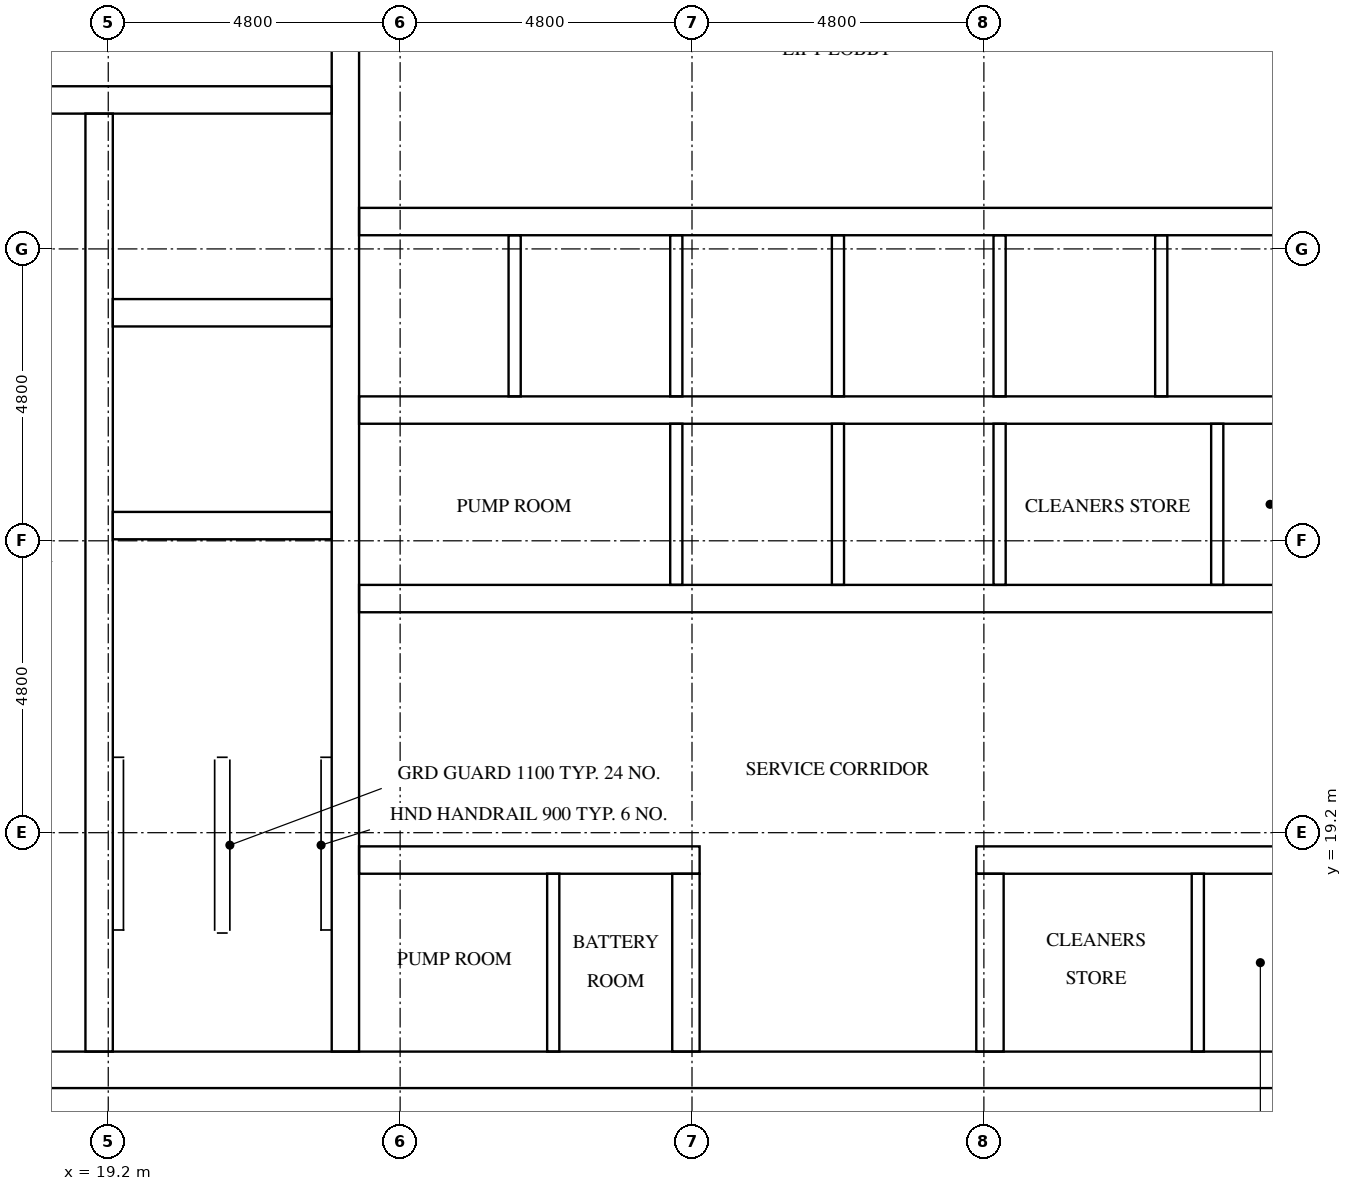
"""IFC4 building model, lengths in metres.
Left out: names, types, materials, properties, quantities, classifications, styles, units other than length and angle.
Written with IfcOpenShell. Run it as: python <this file> out.ifc"""

import sys

from ifc_helpers import new_model, si_unit, direction, frame, frame_2d, origin, place, context, subcontext, project, spatial, rectangle, extrude, element, fill, save


model = new_model("IFC4")
c1 = context("Model", 3, precision=1e-05, world=origin(), true_north=direction((0.0, 1.0)))
c2 = subcontext(c1, "Body", "Model", "MODEL_VIEW")
j1 = project(units=[si_unit("LENGTHUNIT", "METRE"), si_unit("PLANEANGLEUNIT", "RADIAN")], contexts=[c1])
p1 = place(None, origin())
s1 = spatial("IfcSite", under=j1, at=p1, CompositionType="ELEMENT")
p2 = place(p1, origin())
s2 = spatial("IfcBuilding", under=s1, at=p2, CompositionType="ELEMENT")
p3 = place(p2, frame((0.0, 0.0, 259.7)))
s3 = spatial("IfcBuildingStorey", under=s2, at=p3, CompositionType="ELEMENT", Elevation=259.7)
p4 = place(p3, frame((15.0, 15.3, 0.0), z_axis=(0.0, 0.0, 1.0), x_axis=(1.0, 0.0, 0.0)))
e1 = element("IfcWall", 1, at=p4, inside=s3, PredefinedType="SHEAR", context=c2, shape_type="SweptSolid", body=[
    extrude(rectangle(XDim=32.4, YDim=0.6, at=frame_2d((16.2, 0.0))), origin(), (0.0, 0.0, 1.0), 3.1),
])
p5 = place(p4, frame((15.3, 0.0, 0.0)))
e2 = element("IfcOpeningElement", 2, at=p5, cuts=e1, PredefinedType="OPENING", context=c2, shape_type="SweptSolid", body=[
    extrude(rectangle(XDim=1.8, YDim=2.1, at=frame_2d((0.9, 1.05))), frame((0.0, 0.31, 0.0), z_axis=(0.0, -1.0, 0.0), x_axis=(1.0, 0.0, 0.0)), (0.0, 0.0, 1.0), 0.62),
])
p6 = place(p3, frame((19.05, 15.6, 0.0), z_axis=(0.0, 0.0, 1.0), x_axis=(0.0, 1.0, 0.0)))
e3 = element("IfcWall", 3, at=p6, inside=s3, PredefinedType="SHEAR", context=c2, shape_type="SweptSolid", body=[
    extrude(rectangle(XDim=15.425, YDim=0.45, at=frame_2d((7.712, 0.0))), origin(), (0.0, 0.0, 1.0), 3.1),
])
p7 = place(p6, frame((9.85, 0.0, 0.0)))
e4 = element("IfcOpeningElement", 4, at=p7, cuts=e3, PredefinedType="OPENING", context=c2, shape_type="SweptSolid", body=[
    extrude(rectangle(XDim=1.1, YDim=2.1, at=frame_2d((0.55, 1.05))), frame((0.0, 0.235, 0.0), z_axis=(0.0, -1.0, 0.0), x_axis=(1.0, 0.0, 0.0)), (0.0, 0.0, 1.0), 0.47),
])
p8 = place(p6, frame((13.35, 0.0, 0.0)))
e5 = element("IfcOpeningElement", 5, at=p8, cuts=e3, PredefinedType="OPENING", context=c2, shape_type="SweptSolid", body=[
    extrude(rectangle(XDim=1.1, YDim=2.1, at=frame_2d((0.55, 1.05))), frame((0.0, 0.235, 0.0), z_axis=(0.0, -1.0, 0.0), x_axis=(1.0, 0.0, 0.0)), (0.0, 0.0, 1.0), 0.47),
])
p9 = place(p6, frame((0.6, 0.0, 0.0)))
e6 = element("IfcOpeningElement", 6, at=p9, cuts=e3, PredefinedType="OPENING", context=c2, shape_type="SweptSolid", body=[
    extrude(rectangle(XDim=1.2, YDim=2.1, at=frame_2d((0.6, 1.05))), frame((0.0, 0.235, 0.0), z_axis=(0.0, -1.0, 0.0), x_axis=(1.0, 0.0, 0.0)), (0.0, 0.0, 1.0), 0.47),
])
p10 = place(p3, frame((23.1, 15.6, 0.0), z_axis=(0.0, 0.0, 1.0), x_axis=(0.0, 1.0, 0.0)))
e7 = element("IfcWall", 7, at=p10, inside=s3, PredefinedType="SHEAR", context=c2, shape_type="SweptSolid", body=[
    extrude(rectangle(XDim=21.6, YDim=0.45, at=frame_2d((10.8, 0.0))), origin(), (0.0, 0.0, 1.0), 3.1),
])
for number, where, z_axis, x_axis in (
    (8, (19.275, 24.25, 0.0), (0.0, 0.0, 1.0), (1.0, 0.0, 0.0)),
    (9, (19.275, 27.75, 0.0), (0.0, 0.0, 1.0), (1.0, 0.0, 0.0)),
):
    element("IfcWall", number, at=place(p3, frame(where, z_axis=z_axis, x_axis=x_axis)), inside=s3, PredefinedType="SHEAR", context=c2, shape_type="SweptSolid", body=[
        extrude(rectangle(XDim=3.6, YDim=0.45, at=frame_2d((1.8, 0.0))), origin(), (0.0, 0.0, 1.0), 3.1),
    ])
p11 = place(p3, frame((15.6, 31.25, 0.0), z_axis=(0.0, 0.0, 1.0), x_axis=(1.0, 0.0, 0.0)))
e10 = element("IfcWall", 10, at=p11, inside=s3, PredefinedType="SHEAR", context=c2, shape_type="SweptSolid", body=[
    extrude(rectangle(XDim=7.275, YDim=0.45, at=frame_2d((3.637, 0.0))), origin(), (0.0, 0.0, 1.0), 3.1),
])
p12 = place(p3, frame((23.325, 18.75, 0.0), z_axis=(0.0, 0.0, 1.0), x_axis=(1.0, 0.0, 0.0)))
e11 = element("IfcWall", 11, at=p12, inside=s3, PredefinedType="SHEAR", context=c2, shape_type="SweptSolid", body=[
    extrude(rectangle(XDim=5.6, YDim=0.45, at=frame_2d((2.8, 0.0))), origin(), (0.0, 0.0, 1.0), 3.1),
])
p13 = place(p12, frame((1.046, 0.0, 0.0)))
e12 = element("IfcOpeningElement", 12, at=p13, cuts=e11, PredefinedType="OPENING", context=c2, shape_type="SweptSolid", body=[
    extrude(rectangle(XDim=1.0, YDim=2.1, at=frame_2d((0.5, 1.05))), frame((0.0, 0.235, 0.0), z_axis=(0.0, -1.0, 0.0), x_axis=(1.0, 0.0, 0.0)), (0.0, 0.0, 1.0), 0.47),
])
p14 = place(p12, frame((3.721, 0.0, 0.0)))
e13 = element("IfcOpeningElement", 13, at=p14, cuts=e11, PredefinedType="OPENING", context=c2, shape_type="SweptSolid", body=[
    extrude(rectangle(XDim=1.0, YDim=2.1, at=frame_2d((0.5, 1.05))), frame((0.0, 0.235, 0.0), z_axis=(0.0, -1.0, 0.0), x_axis=(1.0, 0.0, 0.0)), (0.0, 0.0, 1.0), 0.47),
])
p15 = place(p3, frame((33.475, 18.75, 0.0), z_axis=(0.0, 0.0, 1.0), x_axis=(1.0, 0.0, 0.0)))
e14 = element("IfcWall", 14, at=p15, inside=s3, PredefinedType="SHEAR", context=c2, shape_type="SweptSolid", body=[
    extrude(rectangle(XDim=5.6, YDim=0.45, at=frame_2d((2.8, 0.0))), origin(), (0.0, 0.0, 1.0), 3.1),
])
p16 = place(p15, frame((1.497, 0.0, 0.0)))
e15 = element("IfcOpeningElement", 15, at=p16, cuts=e14, PredefinedType="OPENING", context=c2, shape_type="SweptSolid", body=[
    extrude(rectangle(XDim=1.0, YDim=2.1, at=frame_2d((0.5, 1.05))), frame((0.0, 0.235, 0.0), z_axis=(0.0, -1.0, 0.0), x_axis=(1.0, 0.0, 0.0)), (0.0, 0.0, 1.0), 0.47),
])
p17 = place(p15, frame((4.171, 0.0, 0.0)))
e16 = element("IfcOpeningElement", 16, at=p17, cuts=e14, PredefinedType="OPENING", context=c2, shape_type="SweptSolid", body=[
    extrude(rectangle(XDim=1.0, YDim=2.1, at=frame_2d((0.5, 1.05))), frame((0.0, 0.235, 0.0), z_axis=(0.0, -1.0, 0.0), x_axis=(1.0, 0.0, 0.0)), (0.0, 0.0, 1.0), 0.47),
])
p18 = place(p3, frame((23.325, 23.05, 0.0), z_axis=(0.0, 0.0, 1.0), x_axis=(1.0, 0.0, 0.0)))
e17 = element("IfcWall", 17, at=p18, inside=s3, PredefinedType="SHEAR", context=c2, shape_type="SweptSolid", body=[
    extrude(rectangle(XDim=15.75, YDim=0.45, at=frame_2d((7.875, 0.0))), origin(), (0.0, 0.0, 1.0), 3.1),
])
p19 = place(p18, frame((2.058, 0.0, 0.0)))
e18 = element("IfcOpeningElement", 18, at=p19, cuts=e17, PredefinedType="OPENING", context=c2, shape_type="SweptSolid", body=[
    extrude(rectangle(XDim=1.0, YDim=2.1, at=frame_2d((0.5, 1.05))), frame((0.0, 0.235, 0.0), z_axis=(0.0, -1.0, 0.0), x_axis=(1.0, 0.0, 0.0)), (0.0, 0.0, 1.0), 0.47),
])
p20 = place(p18, frame((11.823, 0.0, 0.0)))
e19 = element("IfcOpeningElement", 19, at=p20, cuts=e17, PredefinedType="OPENING", context=c2, shape_type="SweptSolid", body=[
    extrude(rectangle(XDim=1.0, YDim=2.1, at=frame_2d((0.5, 1.05))), frame((0.0, 0.235, 0.0), z_axis=(0.0, -1.0, 0.0), x_axis=(1.0, 0.0, 0.0)), (0.0, 0.0, 1.0), 0.47),
])
p21 = place(p18, frame((14.481, 0.0, 0.0)))
e20 = element("IfcOpeningElement", 20, at=p21, cuts=e17, PredefinedType="OPENING", context=c2, shape_type="SweptSolid", body=[
    extrude(rectangle(XDim=1.0, YDim=2.1, at=frame_2d((0.5, 1.05))), frame((0.0, 0.235, 0.0), z_axis=(0.0, -1.0, 0.0), x_axis=(1.0, 0.0, 0.0)), (0.0, 0.0, 1.0), 0.47),
])
p22 = place(p3, frame((23.325, 26.15, 0.0), z_axis=(0.0, 0.0, 1.0), x_axis=(1.0, 0.0, 0.0)))
e21 = element("IfcWall", 21, at=p22, inside=s3, PredefinedType="SHEAR", context=c2, shape_type="SweptSolid", body=[
    extrude(rectangle(XDim=15.75, YDim=0.45, at=frame_2d((7.875, 0.0))), origin(), (0.0, 0.0, 1.0), 3.1),
])
p23 = place(p3, frame((23.325, 29.25, 0.0), z_axis=(0.0, 0.0, 1.0), x_axis=(1.0, 0.0, 0.0)))
e22 = element("IfcWall", 22, at=p23, inside=s3, PredefinedType="SHEAR", context=c2, shape_type="SweptSolid", body=[
    extrude(rectangle(XDim=15.75, YDim=0.45, at=frame_2d((7.875, 0.0))), origin(), (0.0, 0.0, 1.0), 3.1),
])
p24 = place(p23, frame((0.679, 0.0, 0.0)))
e23 = element("IfcOpeningElement", 23, at=p24, cuts=e22, PredefinedType="OPENING", context=c2, shape_type="SweptSolid", body=[
    extrude(rectangle(XDim=1.1, YDim=2.1, at=frame_2d((0.55, 1.05))), frame((0.0, 0.235, 0.0), z_axis=(0.0, -1.0, 0.0), x_axis=(1.0, 0.0, 0.0)), (0.0, 0.0, 1.0), 0.47),
])
p25 = place(p23, frame((3.337, 0.0, 0.0)))
e24 = element("IfcOpeningElement", 24, at=p25, cuts=e22, PredefinedType="OPENING", context=c2, shape_type="SweptSolid", body=[
    extrude(rectangle(XDim=1.1, YDim=2.1, at=frame_2d((0.55, 1.05))), frame((0.0, 0.235, 0.0), z_axis=(0.0, -1.0, 0.0), x_axis=(1.0, 0.0, 0.0)), (0.0, 0.0, 1.0), 0.47),
])
p26 = place(p23, frame((5.996, 0.0, 0.0)))
e25 = element("IfcOpeningElement", 25, at=p26, cuts=e22, PredefinedType="OPENING", context=c2, shape_type="SweptSolid", body=[
    extrude(rectangle(XDim=1.1, YDim=2.1, at=frame_2d((0.55, 1.05))), frame((0.0, 0.235, 0.0), z_axis=(0.0, -1.0, 0.0), x_axis=(1.0, 0.0, 0.0)), (0.0, 0.0, 1.0), 0.47),
])
p27 = place(p23, frame((8.654, 0.0, 0.0)))
e26 = element("IfcOpeningElement", 26, at=p27, cuts=e22, PredefinedType="OPENING", context=c2, shape_type="SweptSolid", body=[
    extrude(rectangle(XDim=1.1, YDim=2.1, at=frame_2d((0.55, 1.05))), frame((0.0, 0.235, 0.0), z_axis=(0.0, -1.0, 0.0), x_axis=(1.0, 0.0, 0.0)), (0.0, 0.0, 1.0), 0.47),
])
p28 = place(p23, frame((11.312, 0.0, 0.0)))
e27 = element("IfcOpeningElement", 27, at=p28, cuts=e22, PredefinedType="OPENING", context=c2, shape_type="SweptSolid", body=[
    extrude(rectangle(XDim=1.1, YDim=2.1, at=frame_2d((0.55, 1.05))), frame((0.0, 0.235, 0.0), z_axis=(0.0, -1.0, 0.0), x_axis=(1.0, 0.0, 0.0)), (0.0, 0.0, 1.0), 0.47),
])
p29 = place(p23, frame((13.971, 0.0, 0.0)))
e28 = element("IfcOpeningElement", 28, at=p29, cuts=e22, PredefinedType="OPENING", context=c2, shape_type="SweptSolid", body=[
    extrude(rectangle(XDim=1.1, YDim=2.1, at=frame_2d((0.55, 1.05))), frame((0.0, 0.235, 0.0), z_axis=(0.0, -1.0, 0.0), x_axis=(1.0, 0.0, 0.0)), (0.0, 0.0, 1.0), 0.47),
])
for number, where, z_axis, x_axis in (
    (29, (28.7, 15.6, 0.0), (0.0, 0.0, 1.0), (0.0, 1.0, 0.0)),
    (30, (33.7, 15.6, 0.0), (0.0, 0.0, 1.0), (0.0, 1.0, 0.0)),
):
    element("IfcWall", number, at=place(p3, frame(where, z_axis=z_axis, x_axis=x_axis)), inside=s3, PredefinedType="SHEAR", context=c2, shape_type="SweptSolid", body=[
        extrude(rectangle(XDim=2.925, YDim=0.45, at=frame_2d((1.462, 0.0))), origin(), (0.0, 0.0, 1.0), 3.1),
    ])
p30 = place(p3, frame((25.883, 26.375, 0.0), z_axis=(0.0, 0.0, 1.0), x_axis=(0.0, 1.0, 0.0)))
e31 = element("IfcWall", 31, at=p30, inside=s3, PredefinedType="SOLIDWALL", context=c2, shape_type="SweptSolid", body=[
    extrude(rectangle(XDim=2.65, YDim=0.2, at=frame_2d((1.325, 0.0))), origin(), (0.0, 0.0, 1.0), 3.1),
])
p31 = place(p3, frame((28.542, 23.275, 0.0), z_axis=(0.0, 0.0, 1.0), x_axis=(0.0, 1.0, 0.0)))
e32 = element("IfcWall", 32, at=p31, inside=s3, PredefinedType="SOLIDWALL", context=c2, shape_type="SweptSolid", body=[
    extrude(rectangle(XDim=2.65, YDim=0.2, at=frame_2d((1.325, 0.0))), origin(), (0.0, 0.0, 1.0), 3.1),
])
p32 = place(p3, frame((28.542, 26.375, 0.0), z_axis=(0.0, 0.0, 1.0), x_axis=(0.0, 1.0, 0.0)))
e33 = element("IfcWall", 33, at=p32, inside=s3, PredefinedType="SOLIDWALL", context=c2, shape_type="SweptSolid", body=[
    extrude(rectangle(XDim=2.65, YDim=0.2, at=frame_2d((1.325, 0.0))), origin(), (0.0, 0.0, 1.0), 3.1),
])
p33 = place(p3, frame((31.2, 23.275, 0.0), z_axis=(0.0, 0.0, 1.0), x_axis=(0.0, 1.0, 0.0)))
e34 = element("IfcWall", 34, at=p33, inside=s3, PredefinedType="SOLIDWALL", context=c2, shape_type="SweptSolid", body=[
    extrude(rectangle(XDim=2.65, YDim=0.2, at=frame_2d((1.325, 0.0))), origin(), (0.0, 0.0, 1.0), 3.1),
])
p34 = place(p3, frame((31.2, 26.375, 0.0), z_axis=(0.0, 0.0, 1.0), x_axis=(0.0, 1.0, 0.0)))
e35 = element("IfcWall", 35, at=p34, inside=s3, PredefinedType="SOLIDWALL", context=c2, shape_type="SweptSolid", body=[
    extrude(rectangle(XDim=2.65, YDim=0.2, at=frame_2d((1.325, 0.0))), origin(), (0.0, 0.0, 1.0), 3.1),
])
p35 = place(p3, frame((33.858, 23.275, 0.0), z_axis=(0.0, 0.0, 1.0), x_axis=(0.0, 1.0, 0.0)))
e36 = element("IfcWall", 36, at=p35, inside=s3, PredefinedType="SOLIDWALL", context=c2, shape_type="SweptSolid", body=[
    extrude(rectangle(XDim=2.65, YDim=0.2, at=frame_2d((1.325, 0.0))), origin(), (0.0, 0.0, 1.0), 3.1),
])
for number, where, z_axis, x_axis in (
    (37, (33.858, 26.375, 0.0), (0.0, 0.0, 1.0), (0.0, 1.0, 0.0)),
    (38, (36.517, 26.375, 0.0), (0.0, 0.0, 1.0), (0.0, 1.0, 0.0)),
):
    element("IfcWall", number, at=place(p3, frame(where, z_axis=z_axis, x_axis=x_axis)), inside=s3, PredefinedType="SOLIDWALL", context=c2, shape_type="SweptSolid", body=[
        extrude(rectangle(XDim=2.65, YDim=0.2, at=frame_2d((1.325, 0.0))), origin(), (0.0, 0.0, 1.0), 3.1),
    ])
p36 = place(p3, frame((37.438, 23.275, 0.0), z_axis=(0.0, 0.0, 1.0), x_axis=(0.0, 1.0, 0.0)))
e39 = element("IfcWall", 39, at=p36, inside=s3, PredefinedType="PARTITIONING", context=c2, shape_type="SweptSolid", body=[
    extrude(rectangle(XDim=2.65, YDim=0.2, at=frame_2d((1.325, 0.0))), origin(), (0.0, 0.0, 1.0), 3.1),
])
for number, where, z_axis, x_axis in (
    (40, (26.518, 15.6, 0.0), (0.0, 0.0, 1.0), (0.0, 1.0, 0.0)),
    (41, (37.118, 15.6, 0.0), (0.0, 0.0, 1.0), (0.0, 1.0, 0.0)),
):
    element("IfcWall", number, at=place(p3, frame(where, z_axis=z_axis, x_axis=x_axis)), inside=s3, PredefinedType="PARTITIONING", context=c2, shape_type="SweptSolid", body=[
        extrude(rectangle(XDim=2.925, YDim=0.2, at=frame_2d((1.462, 0.0))), origin(), (0.0, 0.0, 1.0), 3.1),
    ])
p37 = place(p24, origin())
e42 = element("IfcDoor", 42, at=p37, inside=s3, OperationType="DOUBLE_DOOR_SLIDING", PredefinedType="DOOR", context=c2, shape_type="SweptSolid", body=[
    extrude(rectangle(XDim=1.1, YDim=2.1, at=frame_2d((0.55, 1.05))), frame((0.0, 0.025, 0.0), z_axis=(0.0, -1.0, 0.0), x_axis=(1.0, 0.0, 0.0)), (0.0, 0.0, 1.0), 0.05),
])
fill(e23, e42)
p38 = place(p25, origin())
e43 = element("IfcDoor", 43, at=p38, inside=s3, OperationType="DOUBLE_DOOR_SLIDING", PredefinedType="DOOR", context=c2, shape_type="SweptSolid", body=[
    extrude(rectangle(XDim=1.1, YDim=2.1, at=frame_2d((0.55, 1.05))), frame((0.0, 0.025, 0.0), z_axis=(0.0, -1.0, 0.0), x_axis=(1.0, 0.0, 0.0)), (0.0, 0.0, 1.0), 0.05),
])
fill(e24, e43)
p39 = place(p26, origin())
e44 = element("IfcDoor", 44, at=p39, inside=s3, OperationType="DOUBLE_DOOR_SLIDING", PredefinedType="DOOR", context=c2, shape_type="SweptSolid", body=[
    extrude(rectangle(XDim=1.1, YDim=2.1, at=frame_2d((0.55, 1.05))), frame((0.0, 0.025, 0.0), z_axis=(0.0, -1.0, 0.0), x_axis=(1.0, 0.0, 0.0)), (0.0, 0.0, 1.0), 0.05),
])
fill(e25, e44)
p40 = place(p27, origin())
e45 = element("IfcDoor", 45, at=p40, inside=s3, OperationType="DOUBLE_DOOR_SLIDING", PredefinedType="DOOR", context=c2, shape_type="SweptSolid", body=[
    extrude(rectangle(XDim=1.1, YDim=2.1, at=frame_2d((0.55, 1.05))), frame((0.0, 0.025, 0.0), z_axis=(0.0, -1.0, 0.0), x_axis=(1.0, 0.0, 0.0)), (0.0, 0.0, 1.0), 0.05),
])
fill(e26, e45)
p41 = place(p28, origin())
e46 = element("IfcDoor", 46, at=p41, inside=s3, OperationType="DOUBLE_DOOR_SLIDING", PredefinedType="DOOR", context=c2, shape_type="SweptSolid", body=[
    extrude(rectangle(XDim=1.1, YDim=2.1, at=frame_2d((0.55, 1.05))), frame((0.0, 0.025, 0.0), z_axis=(0.0, -1.0, 0.0), x_axis=(1.0, 0.0, 0.0)), (0.0, 0.0, 1.0), 0.05),
])
fill(e27, e46)
p42 = place(p29, origin())
e47 = element("IfcDoor", 47, at=p42, inside=s3, OperationType="DOUBLE_DOOR_SLIDING", PredefinedType="DOOR", context=c2, shape_type="SweptSolid", body=[
    extrude(rectangle(XDim=1.1, YDim=2.1, at=frame_2d((0.55, 1.05))), frame((0.0, 0.025, 0.0), z_axis=(0.0, -1.0, 0.0), x_axis=(1.0, 0.0, 0.0)), (0.0, 0.0, 1.0), 0.05),
])
fill(e28, e47)
p43 = place(p7, origin())
e48 = element("IfcDoor", 48, at=p43, inside=s3, OperationType="DOUBLE_DOOR_SLIDING", PredefinedType="DOOR", context=c2, shape_type="SweptSolid", body=[
    extrude(rectangle(XDim=1.1, YDim=2.1, at=frame_2d((0.55, 1.05))), frame((0.0, 0.025, 0.0), z_axis=(0.0, -1.0, 0.0), x_axis=(1.0, 0.0, 0.0)), (0.0, 0.0, 1.0), 0.05),
])
fill(e4, e48)
p44 = place(p8, origin())
e49 = element("IfcDoor", 49, at=p44, inside=s3, OperationType="DOUBLE_DOOR_SLIDING", PredefinedType="DOOR", context=c2, shape_type="SweptSolid", body=[
    extrude(rectangle(XDim=1.1, YDim=2.1, at=frame_2d((0.55, 1.05))), frame((0.0, 0.025, 0.0), z_axis=(0.0, -1.0, 0.0), x_axis=(1.0, 0.0, 0.0)), (0.0, 0.0, 1.0), 0.05),
])
fill(e5, e49)
p45 = place(p9, frame((1.2, 0.0, 0.0), z_axis=(0.0, 0.0, 1.0), x_axis=(-1.0, 0.0, 0.0)))
e50 = element("IfcDoor", 50, at=p45, inside=s3, OperationType="SINGLE_SWING_RIGHT", PredefinedType="DOOR", context=c2, shape_type="SweptSolid", body=[
    extrude(rectangle(XDim=1.2, YDim=2.1, at=frame_2d((0.6, 1.05))), frame((0.0, 0.025, 0.0), z_axis=(0.0, -1.0, 0.0), x_axis=(1.0, 0.0, 0.0)), (0.0, 0.0, 1.0), 0.05),
])
fill(e6, e50)
p46 = place(p5, frame((1.8, 0.0, 0.0), z_axis=(0.0, 0.0, 1.0), x_axis=(-1.0, 0.0, 0.0)))
e51 = element("IfcDoor", 51, at=p46, inside=s3, OperationType="DOUBLE_DOOR_SINGLE_SWING", PredefinedType="DOOR", context=c2, shape_type="SweptSolid", body=[
    extrude(rectangle(XDim=1.8, YDim=2.1, at=frame_2d((0.9, 1.05))), frame((0.0, 0.025, 0.0), z_axis=(0.0, -1.0, 0.0), x_axis=(1.0, 0.0, 0.0)), (0.0, 0.0, 1.0), 0.05),
])
fill(e2, e51)
p47 = place(p19, frame((1.0, 0.0, 0.0), z_axis=(0.0, 0.0, 1.0), x_axis=(-1.0, 0.0, 0.0)))
e52 = element("IfcDoor", 52, at=p47, inside=s3, OperationType="SINGLE_SWING_LEFT", PredefinedType="DOOR", context=c2, shape_type="SweptSolid", body=[
    extrude(rectangle(XDim=1.0, YDim=2.1, at=frame_2d((0.5, 1.05))), frame((0.0, 0.025, 0.0), z_axis=(0.0, -1.0, 0.0), x_axis=(1.0, 0.0, 0.0)), (0.0, 0.0, 1.0), 0.05),
])
fill(e18, e52)
p48 = place(p20, frame((1.0, 0.0, 0.0), z_axis=(0.0, 0.0, 1.0), x_axis=(-1.0, 0.0, 0.0)))
e53 = element("IfcDoor", 53, at=p48, inside=s3, OperationType="SINGLE_SWING_RIGHT", PredefinedType="DOOR", context=c2, shape_type="SweptSolid", body=[
    extrude(rectangle(XDim=1.0, YDim=2.1, at=frame_2d((0.5, 1.05))), frame((0.0, 0.025, 0.0), z_axis=(0.0, -1.0, 0.0), x_axis=(1.0, 0.0, 0.0)), (0.0, 0.0, 1.0), 0.05),
])
fill(e19, e53)
p49 = place(p21, frame((1.0, 0.0, 0.0), z_axis=(0.0, 0.0, 1.0), x_axis=(-1.0, 0.0, 0.0)))
e54 = element("IfcDoor", 54, at=p49, inside=s3, OperationType="SINGLE_SWING_LEFT", PredefinedType="DOOR", context=c2, shape_type="SweptSolid", body=[
    extrude(rectangle(XDim=1.0, YDim=2.1, at=frame_2d((0.5, 1.05))), frame((0.0, 0.025, 0.0), z_axis=(0.0, -1.0, 0.0), x_axis=(1.0, 0.0, 0.0)), (0.0, 0.0, 1.0), 0.05),
])
fill(e20, e54)
p50 = place(p13, origin())
e55 = element("IfcDoor", 55, at=p50, inside=s3, OperationType="SINGLE_SWING_RIGHT", PredefinedType="DOOR", context=c2, shape_type="SweptSolid", body=[
    extrude(rectangle(XDim=1.0, YDim=2.1, at=frame_2d((0.5, 1.05))), frame((0.0, 0.025, 0.0), z_axis=(0.0, -1.0, 0.0), x_axis=(1.0, 0.0, 0.0)), (0.0, 0.0, 1.0), 0.05),
])
fill(e12, e55)
p51 = place(p14, origin())
e56 = element("IfcDoor", 56, at=p51, inside=s3, OperationType="SINGLE_SWING_LEFT", PredefinedType="DOOR", context=c2, shape_type="SweptSolid", body=[
    extrude(rectangle(XDim=1.0, YDim=2.1, at=frame_2d((0.5, 1.05))), frame((0.0, 0.025, 0.0), z_axis=(0.0, -1.0, 0.0), x_axis=(1.0, 0.0, 0.0)), (0.0, 0.0, 1.0), 0.05),
])
fill(e13, e56)
p52 = place(p16, origin())
e57 = element("IfcDoor", 57, at=p52, inside=s3, OperationType="SINGLE_SWING_RIGHT", PredefinedType="DOOR", context=c2, shape_type="SweptSolid", body=[
    extrude(rectangle(XDim=1.0, YDim=2.1, at=frame_2d((0.5, 1.05))), frame((0.0, 0.025, 0.0), z_axis=(0.0, -1.0, 0.0), x_axis=(1.0, 0.0, 0.0)), (0.0, 0.0, 1.0), 0.05),
])
fill(e15, e57)
p53 = place(p17, origin())
e58 = element("IfcDoor", 58, at=p53, inside=s3, OperationType="SINGLE_SWING_LEFT", PredefinedType="DOOR", context=c2, shape_type="SweptSolid", body=[
    extrude(rectangle(XDim=1.0, YDim=2.1, at=frame_2d((0.5, 1.05))), frame((0.0, 0.025, 0.0), z_axis=(0.0, -1.0, 0.0), x_axis=(1.0, 0.0, 0.0)), (0.0, 0.0, 1.0), 0.05),
])
fill(e16, e58)
save(model, sys.argv[1])
